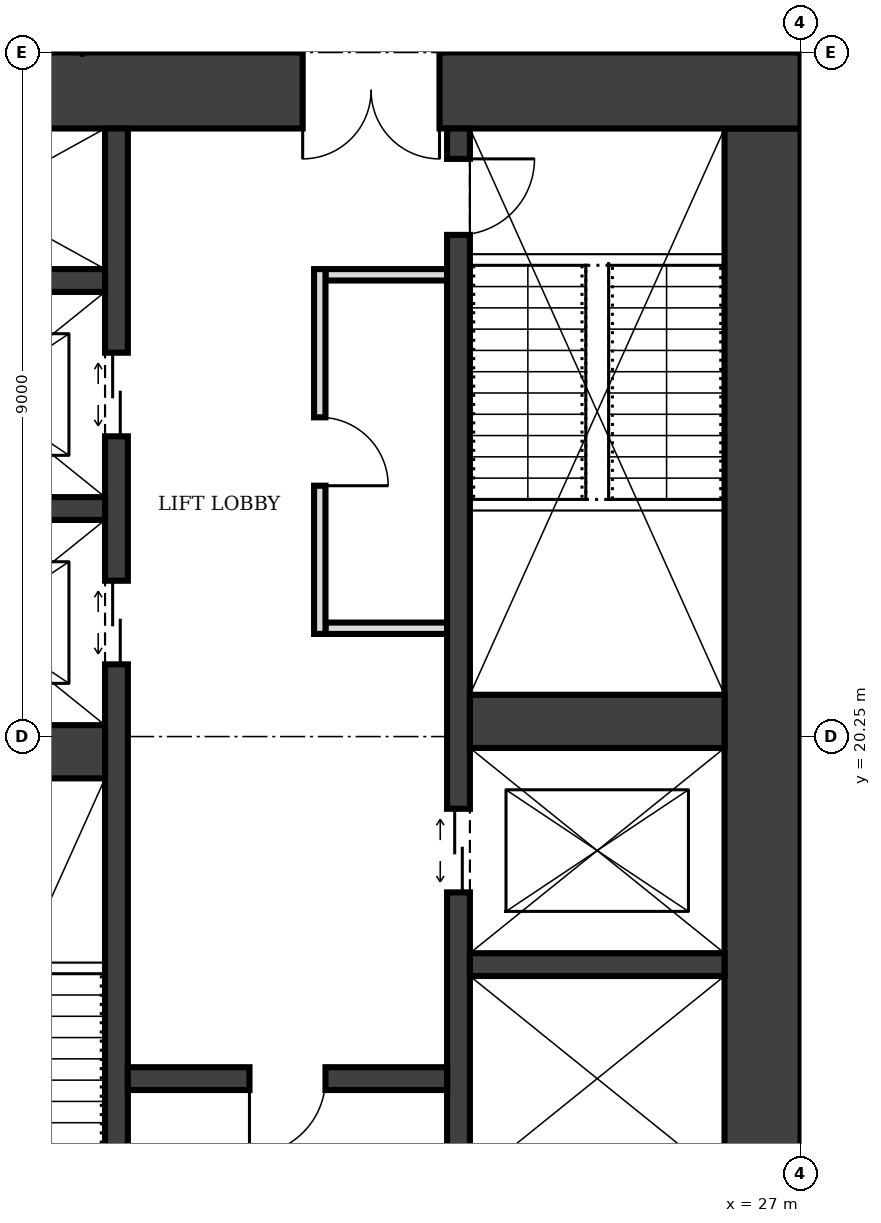
"""IFC4 building model, lengths in metres.
Left out: names, types, materials, properties, quantities, classifications, styles, units other than length and angle.
Written with IfcOpenShell. Run it as: python <this file> out.ifc"""

import sys

from ifc_helpers import new_model, si_unit, direction, frame, frame_2d, origin, place, context, subcontext, project, spatial, rectangle, extrude, element, fill, save


model = new_model("IFC4")
c1 = context("Model", 3, precision=1e-05, world=origin(), true_north=direction((0.0, 1.0)))
c2 = subcontext(c1, "Body", "Model", "MODEL_VIEW")
j1 = project(units=[si_unit("LENGTHUNIT", "METRE"), si_unit("PLANEANGLEUNIT", "RADIAN")], contexts=[c1])
p1 = place(None, origin())
s1 = spatial("IfcSite", under=j1, at=p1, CompositionType="ELEMENT")
p2 = place(p1, origin())
s2 = spatial("IfcBuilding", under=s1, at=p2, CompositionType="ELEMENT")
p3 = place(p2, frame((0.0, 0.0, 53.0)))
s3 = spatial("IfcBuildingStorey", under=s2, at=p3, CompositionType="ELEMENT", Elevation=53.0)
p4 = place(p3, frame((26.5, 12.25, 0.0), z_axis=(0.0, 0.0, 1.0), x_axis=(0.0, 1.0, 0.0)))
e1 = element("IfcWall", 1, at=p4, inside=s3, PredefinedType="SHEAR", context=c2, shape_type="SweptSolid", body=[
    extrude(rectangle(XDim=16.0, YDim=1.0, at=frame_2d((8.0, 0.0))), origin(), (0.0, 0.0, 1.0), 4.0),
])
p5 = place(p3, frame((27.0, 28.75, 0.0), z_axis=(0.0, 0.0, 1.0), x_axis=(-1.0, 0.0, 0.0)))
e2 = element("IfcWall", 2, at=p5, inside=s3, PredefinedType="SHEAR", context=c2, shape_type="SweptSolid", body=[
    extrude(rectangle(XDim=13.5, YDim=1.0, at=frame_2d((6.75, 0.0))), origin(), (0.0, 0.0, 1.0), 4.0),
])
p6 = place(p5, frame((4.75, 0.0, 0.0)))
e3 = element("IfcOpeningElement", 3, at=p6, cuts=e2, PredefinedType="OPENING", context=c2, shape_type="SweptSolid", body=[
    extrude(rectangle(XDim=1.8, YDim=2.1, at=frame_2d((0.9, 1.05))), frame((0.0, 0.51, 0.0), z_axis=(0.0, -1.0, 0.0), x_axis=(1.0, 0.0, 0.0)), (0.0, 0.0, 1.0), 1.02),
])
p7 = place(p3, frame((18.0, 12.25, 0.0), z_axis=(0.0, 0.0, 1.0), x_axis=(0.0, 1.0, 0.0)))
e4 = element("IfcWall", 4, at=p7, inside=s3, PredefinedType="SHEAR", context=c2, shape_type="SweptSolid", body=[
    extrude(rectangle(XDim=16.0, YDim=0.3, at=frame_2d((8.0, 0.0))), origin(), (0.0, 0.0, 1.0), 4.0),
])
p8 = place(p7, frame((0.4, 0.0, 0.0)))
e5 = element("IfcOpeningElement", 5, at=p8, cuts=e4, PredefinedType="OPENING", context=c2, shape_type="SweptSolid", body=[
    extrude(rectangle(XDim=1.0, YDim=2.1, at=frame_2d((0.5, 1.05))), frame((0.0, 0.16, 0.0), z_axis=(0.0, -1.0, 0.0), x_axis=(1.0, 0.0, 0.0)), (0.0, 0.0, 1.0), 0.32),
])
p9 = place(p7, frame((8.95, 0.0, 0.0)))
e6 = element("IfcOpeningElement", 6, at=p9, cuts=e4, PredefinedType="OPENING", context=c2, shape_type="SweptSolid", body=[
    extrude(rectangle(XDim=1.1, YDim=2.1, at=frame_2d((0.55, 1.05))), frame((0.0, 0.16, 0.0), z_axis=(0.0, -1.0, 0.0), x_axis=(1.0, 0.0, 0.0)), (0.0, 0.0, 1.0), 0.32),
])
p10 = place(p7, frame((11.95, 0.0, 0.0)))
e7 = element("IfcOpeningElement", 7, at=p10, cuts=e4, PredefinedType="OPENING", context=c2, shape_type="SweptSolid", body=[
    extrude(rectangle(XDim=1.1, YDim=2.1, at=frame_2d((0.55, 1.05))), frame((0.0, 0.16, 0.0), z_axis=(0.0, -1.0, 0.0), x_axis=(1.0, 0.0, 0.0)), (0.0, 0.0, 1.0), 0.32),
])
p11 = place(p3, frame((22.5, 12.25, 0.0), z_axis=(0.0, 0.0, 1.0), x_axis=(0.0, 1.0, 0.0)))
e8 = element("IfcWall", 8, at=p11, inside=s3, PredefinedType="SHEAR", context=c2, shape_type="SweptSolid", body=[
    extrude(rectangle(XDim=16.0, YDim=0.3, at=frame_2d((8.0, 0.0))), origin(), (0.0, 0.0, 1.0), 4.0),
])
p12 = place(p11, frame((14.6, 0.0, 0.0)))
e9 = element("IfcOpeningElement", 9, at=p12, cuts=e8, PredefinedType="OPENING", context=c2, shape_type="SweptSolid", body=[
    extrude(rectangle(XDim=1.0, YDim=2.1, at=frame_2d((0.5, 1.05))), frame((0.0, 0.16, 0.0), z_axis=(0.0, -1.0, 0.0), x_axis=(1.0, 0.0, 0.0)), (0.0, 0.0, 1.0), 0.32),
])
p13 = place(p11, frame((0.375, 0.0, 0.0)))
e10 = element("IfcOpeningElement", 10, at=p13, cuts=e8, PredefinedType="OPENING", context=c2, shape_type="SweptSolid", body=[
    extrude(rectangle(XDim=1.1, YDim=2.1, at=frame_2d((0.55, 1.05))), frame((0.0, 0.16, 0.0), z_axis=(0.0, -1.0, 0.0), x_axis=(1.0, 0.0, 0.0)), (0.0, 0.0, 1.0), 0.32),
])
p14 = place(p11, frame((5.95, 0.0, 0.0)))
e11 = element("IfcOpeningElement", 11, at=p14, cuts=e8, PredefinedType="OPENING", context=c2, shape_type="SweptSolid", body=[
    extrude(rectangle(XDim=1.1, YDim=2.1, at=frame_2d((0.55, 1.05))), frame((0.0, 0.16, 0.0), z_axis=(0.0, -1.0, 0.0), x_axis=(1.0, 0.0, 0.0)), (0.0, 0.0, 1.0), 0.32),
])
p15 = place(p3, frame((14.5, 20.05, 0.0), z_axis=(0.0, 0.0, 1.0), x_axis=(1.0, 0.0, 0.0)))
e12 = element("IfcWall", 12, at=p15, inside=s3, PredefinedType="SHEAR", context=c2, shape_type="SweptSolid", body=[
    extrude(rectangle(XDim=3.35, YDim=0.7, at=frame_2d((1.675, 0.0))), origin(), (0.0, 0.0, 1.0), 4.0),
])
p16 = place(p3, frame((18.15, 15.75, 0.0), z_axis=(0.0, 0.0, 1.0), x_axis=(1.0, 0.0, 0.0)))
e13 = element("IfcWall", 13, at=p16, inside=s3, PredefinedType="SHEAR", context=c2, shape_type="SweptSolid", body=[
    extrude(rectangle(XDim=4.2, YDim=0.3, at=frame_2d((2.1, 0.0))), origin(), (0.0, 0.0, 1.0), 4.0),
])
p17 = place(p16, frame((1.6, 0.0, 0.0)))
e14 = element("IfcOpeningElement", 14, at=p17, cuts=e13, PredefinedType="OPENING", context=c2, shape_type="SweptSolid", body=[
    extrude(rectangle(XDim=1.0, YDim=2.1, at=frame_2d((0.5, 1.05))), frame((0.0, 0.16, 0.0), z_axis=(0.0, -1.0, 0.0), x_axis=(1.0, 0.0, 0.0)), (0.0, 0.0, 1.0), 0.32),
])
p18 = place(p3, frame((22.65, 17.25, 0.0), z_axis=(0.0, 0.0, 1.0), x_axis=(1.0, 0.0, 0.0)))
e15 = element("IfcWall", 15, at=p18, inside=s3, PredefinedType="SHEAR", context=c2, shape_type="SweptSolid", body=[
    extrude(rectangle(XDim=3.35, YDim=0.3, at=frame_2d((1.675, 0.0))), origin(), (0.0, 0.0, 1.0), 4.0),
])
p19 = place(p3, frame((22.65, 20.45, 0.0), z_axis=(0.0, 0.0, 1.0), x_axis=(1.0, 0.0, 0.0)))
e16 = element("IfcWall", 16, at=p19, inside=s3, PredefinedType="SHEAR", context=c2, shape_type="SweptSolid", body=[
    extrude(rectangle(XDim=3.35, YDim=0.7, at=frame_2d((1.675, 0.0))), origin(), (0.0, 0.0, 1.0), 4.0),
])
for number, where, z_axis, x_axis in (
    (17, (14.5, 23.25, 0.0), (0.0, 0.0, 1.0), (1.0, 0.0, 0.0)),
    (18, (14.5, 26.25, 0.0), (0.0, 0.0, 1.0), (1.0, 0.0, 0.0)),
):
    element("IfcWall", number, at=place(p3, frame(where, z_axis=z_axis, x_axis=x_axis)), inside=s3, PredefinedType="SHEAR", context=c2, shape_type="SweptSolid", body=[
        extrude(rectangle(XDim=3.35, YDim=0.3, at=frame_2d((1.675, 0.0))), origin(), (0.0, 0.0, 1.0), 4.0),
    ])
p20 = place(p3, frame((20.675, 21.6, 0.0), z_axis=(0.0, 0.0, 1.0), x_axis=(0.0, 1.0, 0.0)))
e19 = element("IfcWall", 19, at=p20, inside=s3, PredefinedType="PARTITIONING", context=c2, shape_type="SweptSolid", body=[
    extrude(rectangle(XDim=4.8, YDim=0.15, at=frame_2d((2.4, 0.0))), origin(), (0.0, 0.0, 1.0), 3.75),
])
p21 = place(p20, frame((1.95, 0.0, 0.0)))
e20 = element("IfcOpeningElement", 20, at=p21, cuts=e19, PredefinedType="OPENING", context=c2, shape_type="SweptSolid", body=[
    extrude(rectangle(XDim=0.9, YDim=2.1, at=frame_2d((0.45, 1.05))), frame((0.0, 0.085, 0.0), z_axis=(0.0, -1.0, 0.0), x_axis=(1.0, 0.0, 0.0)), (0.0, 0.0, 1.0), 0.17),
])
for number, where, z_axis, x_axis in (
    (21, (20.75, 21.675, 0.0), (0.0, 0.0, 1.0), (1.0, 0.0, 0.0)),
    (22, (20.75, 26.325, 0.0), (0.0, 0.0, 1.0), (1.0, 0.0, 0.0)),
):
    element("IfcWall", number, at=place(p3, frame(where, z_axis=z_axis, x_axis=x_axis)), inside=s3, PredefinedType="PARTITIONING", context=c2, shape_type="SweptSolid", body=[
        extrude(rectangle(XDim=1.6, YDim=0.15, at=frame_2d((0.8, 0.0))), origin(), (0.0, 0.0, 1.0), 3.75),
    ])
p22 = place(p6, origin())
e23 = element("IfcDoor", 23, at=p22, inside=s3, OperationType="DOUBLE_DOOR_SINGLE_SWING", PredefinedType="DOOR", context=c2, shape_type="SweptSolid", body=[
    extrude(rectangle(XDim=1.8, YDim=2.1, at=frame_2d((0.9, 1.05))), frame((0.0, 0.025, 0.0), z_axis=(0.0, -1.0, 0.0), x_axis=(1.0, 0.0, 0.0)), (0.0, 0.0, 1.0), 0.05),
])
fill(e3, e23)
p23 = place(p17, frame((1.0, 0.0, 0.0), z_axis=(0.0, 0.0, 1.0), x_axis=(-1.0, 0.0, 0.0)))
e24 = element("IfcDoor", 24, at=p23, inside=s3, OperationType="SINGLE_SWING_RIGHT", PredefinedType="DOOR", context=c2, shape_type="SweptSolid", body=[
    extrude(rectangle(XDim=1.0, YDim=2.1, at=frame_2d((0.5, 1.05))), frame((0.0, 0.025, 0.0), z_axis=(0.0, -1.0, 0.0), x_axis=(1.0, 0.0, 0.0)), (0.0, 0.0, 1.0), 0.05),
])
fill(e14, e24)
p24 = place(p12, frame((1.0, 0.0, 0.0), z_axis=(0.0, 0.0, 1.0), x_axis=(-1.0, 0.0, 0.0)))
e25 = element("IfcDoor", 25, at=p24, inside=s3, OperationType="SINGLE_SWING_LEFT", PredefinedType="DOOR", context=c2, shape_type="SweptSolid", body=[
    extrude(rectangle(XDim=1.0, YDim=2.1, at=frame_2d((0.5, 1.05))), frame((0.0, 0.025, 0.0), z_axis=(0.0, -1.0, 0.0), x_axis=(1.0, 0.0, 0.0)), (0.0, 0.0, 1.0), 0.05),
])
fill(e9, e25)
p25 = place(p9, origin())
e26 = element("IfcDoor", 26, at=p25, inside=s3, OperationType="DOUBLE_DOOR_SLIDING", PredefinedType="DOOR", context=c2, shape_type="SweptSolid", body=[
    extrude(rectangle(XDim=1.1, YDim=2.1, at=frame_2d((0.55, 1.05))), frame((0.0, 0.025, 0.0), z_axis=(0.0, -1.0, 0.0), x_axis=(1.0, 0.0, 0.0)), (0.0, 0.0, 1.0), 0.05),
])
fill(e6, e26)
p26 = place(p10, origin())
e27 = element("IfcDoor", 27, at=p26, inside=s3, OperationType="DOUBLE_DOOR_SLIDING", PredefinedType="DOOR", context=c2, shape_type="SweptSolid", body=[
    extrude(rectangle(XDim=1.1, YDim=2.1, at=frame_2d((0.55, 1.05))), frame((0.0, 0.025, 0.0), z_axis=(0.0, -1.0, 0.0), x_axis=(1.0, 0.0, 0.0)), (0.0, 0.0, 1.0), 0.05),
])
fill(e7, e27)
p27 = place(p14, origin())
e28 = element("IfcDoor", 28, at=p27, inside=s3, OperationType="DOUBLE_DOOR_SLIDING", PredefinedType="DOOR", context=c2, shape_type="SweptSolid", body=[
    extrude(rectangle(XDim=1.1, YDim=2.1, at=frame_2d((0.55, 1.05))), frame((0.0, 0.025, 0.0), z_axis=(0.0, -1.0, 0.0), x_axis=(1.0, 0.0, 0.0)), (0.0, 0.0, 1.0), 0.05),
])
fill(e11, e28)
p28 = place(p21, frame((0.9, 0.0, 0.0), z_axis=(0.0, 0.0, 1.0), x_axis=(-1.0, 0.0, 0.0)))
e29 = element("IfcDoor", 29, at=p28, inside=s3, OperationType="SINGLE_SWING_RIGHT", PredefinedType="DOOR", context=c2, shape_type="SweptSolid", body=[
    extrude(rectangle(XDim=0.9, YDim=2.1, at=frame_2d((0.45, 1.05))), frame((0.0, 0.025, 0.0), z_axis=(0.0, -1.0, 0.0), x_axis=(1.0, 0.0, 0.0)), (0.0, 0.0, 1.0), 0.05),
])
fill(e20, e29)
save(model, sys.argv[1])
